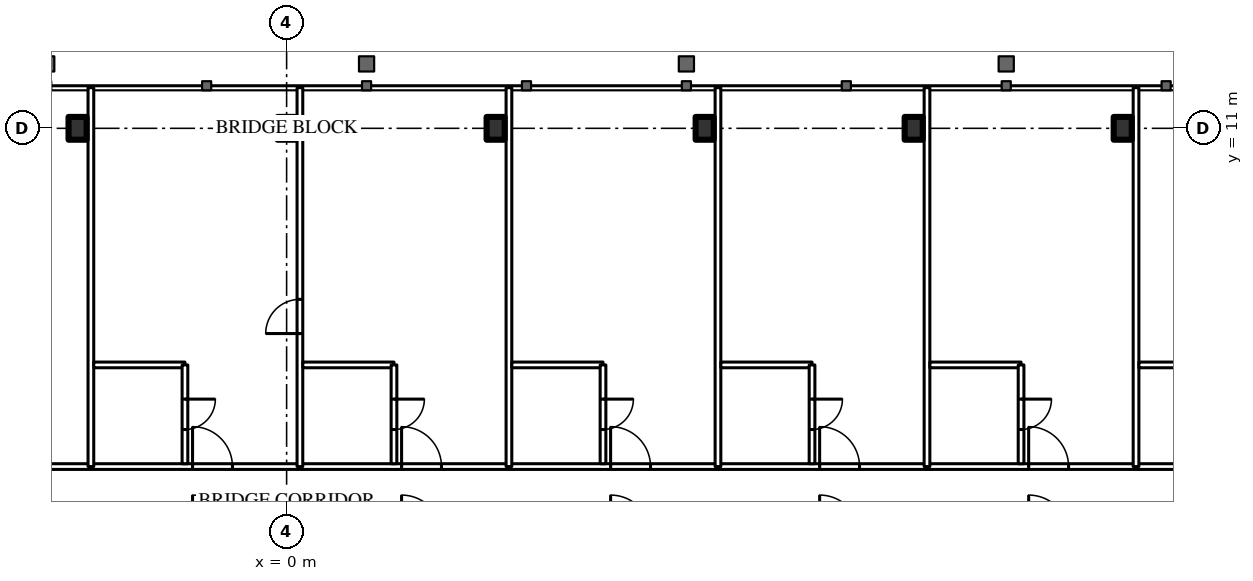
"""IFC4 building model, lengths in metres.
Left out: names, types, materials, properties, quantities, classifications, styles, units other than length and angle.
Written with IfcOpenShell. Run it as: python <this file> out.ifc"""

import sys

from ifc_helpers import new_model, si_unit, direction, frame, frame_2d, origin, origin_2d, place, context, subcontext, project, spatial, rectangle, i_section, extrude, element, fill, save


model = new_model("IFC4")
c1 = context("Model", 3, precision=1e-05, world=origin(), true_north=direction((0.0, 1.0)))
c2 = subcontext(c1, "Body", "Model", "MODEL_VIEW")
j1 = project(units=[si_unit("LENGTHUNIT", "METRE"), si_unit("PLANEANGLEUNIT", "RADIAN")], contexts=[c1])
p1 = place(None, origin())
s1 = spatial("IfcSite", under=j1, at=p1, CompositionType="ELEMENT")
p2 = place(p1, origin())
s2 = spatial("IfcBuilding", under=s1, at=p2, CompositionType="ELEMENT")
p3 = place(p2, frame((0.0, 0.0, 218.9)))
s3 = spatial("IfcBuildingStorey", under=s2, at=p3, CompositionType="ELEMENT", Elevation=218.9)
for number, where, z_axis, x_axis in (
    (1, (-5.5, 11.0, 0.0), (0.0, 0.0, 1.0), (1.0, 0.0, 0.0)),
    (2, (0.0, 11.0, 0.0), (0.0, 0.0, 1.0), (1.0, 0.0, 0.0)),
    (3, (5.5, 11.0, 0.0), (0.0, 0.0, 1.0), (1.0, 0.0, 0.0)),
    (4, (11.0, 11.0, 0.0), (0.0, 0.0, 1.0), (1.0, 0.0, 0.0)),
    (5, (16.5, 11.0, 0.0), (0.0, 0.0, 1.0), (1.0, 0.0, 0.0)),
    (6, (22.0, 11.0, 0.0), (0.0, 0.0, 1.0), (1.0, 0.0, 0.0)),
):
    element("IfcColumn", number, at=place(p3, frame(where, z_axis=z_axis, x_axis=x_axis)), inside=s3, PredefinedType="COLUMN", context=c2, shape_type="SweptSolid", body=[
        extrude(i_section(OverallWidth=0.476, OverallDepth=0.6, WebThickness=0.1, FlangeThickness=0.14, FilletRadius=0.02, at=origin_2d()), origin(), (0.0, 0.0, 1.0), 3.6),
    ])
p4 = place(p3, frame((-27.5, 2.1, 0.0), z_axis=(0.0, 0.0, 1.0), x_axis=(1.0, 0.0, 0.0)))
e7 = element("IfcWall", 7, at=p4, inside=s3, PredefinedType="PARTITIONING", context=c2, shape_type="SweptSolid", body=[
    extrude(rectangle(XDim=55.0, YDim=0.15, at=frame_2d((27.5, 0.0))), origin(), (0.0, 0.0, 1.0), 3.4),
])
p5 = place(p4, frame((2.025, 0.0, 0.0)))
e8 = element("IfcOpeningElement", 8, at=p5, cuts=e7, PredefinedType="OPENING", context=c2, shape_type="SweptSolid", body=[
    extrude(rectangle(XDim=1.05, YDim=2.4, at=frame_2d((0.525, 1.2))), frame((0.0, 0.085, 0.0), z_axis=(0.0, -1.0, 0.0), x_axis=(1.0, 0.0, 0.0)), (0.0, 0.0, 1.0), 0.17),
])
p6 = place(p4, frame((8.525, 0.0, 0.0)))
e9 = element("IfcOpeningElement", 9, at=p6, cuts=e7, PredefinedType="OPENING", context=c2, shape_type="SweptSolid", body=[
    extrude(rectangle(XDim=1.05, YDim=2.4, at=frame_2d((0.525, 1.2))), frame((0.0, 0.085, 0.0), z_axis=(0.0, -1.0, 0.0), x_axis=(1.0, 0.0, 0.0)), (0.0, 0.0, 1.0), 0.17),
])
p7 = place(p4, frame((14.025, 0.0, 0.0)))
e10 = element("IfcOpeningElement", 10, at=p7, cuts=e7, PredefinedType="OPENING", context=c2, shape_type="SweptSolid", body=[
    extrude(rectangle(XDim=1.05, YDim=2.4, at=frame_2d((0.525, 1.2))), frame((0.0, 0.085, 0.0), z_axis=(0.0, -1.0, 0.0), x_axis=(1.0, 0.0, 0.0)), (0.0, 0.0, 1.0), 0.17),
])
p8 = place(p4, frame((19.525, 0.0, 0.0)))
e11 = element("IfcOpeningElement", 11, at=p8, cuts=e7, PredefinedType="OPENING", context=c2, shape_type="SweptSolid", body=[
    extrude(rectangle(XDim=1.05, YDim=2.4, at=frame_2d((0.525, 1.2))), frame((0.0, 0.085, 0.0), z_axis=(0.0, -1.0, 0.0), x_axis=(1.0, 0.0, 0.0)), (0.0, 0.0, 1.0), 0.17),
])
p9 = place(p4, frame((25.025, 0.0, 0.0)))
e12 = element("IfcOpeningElement", 12, at=p9, cuts=e7, PredefinedType="OPENING", context=c2, shape_type="SweptSolid", body=[
    extrude(rectangle(XDim=1.05, YDim=2.4, at=frame_2d((0.525, 1.2))), frame((0.0, 0.085, 0.0), z_axis=(0.0, -1.0, 0.0), x_axis=(1.0, 0.0, 0.0)), (0.0, 0.0, 1.0), 0.17),
])
p10 = place(p4, frame((30.525, 0.0, 0.0)))
e13 = element("IfcOpeningElement", 13, at=p10, cuts=e7, PredefinedType="OPENING", context=c2, shape_type="SweptSolid", body=[
    extrude(rectangle(XDim=1.05, YDim=2.4, at=frame_2d((0.525, 1.2))), frame((0.0, 0.085, 0.0), z_axis=(0.0, -1.0, 0.0), x_axis=(1.0, 0.0, 0.0)), (0.0, 0.0, 1.0), 0.17),
])
p11 = place(p4, frame((36.025, 0.0, 0.0)))
e14 = element("IfcOpeningElement", 14, at=p11, cuts=e7, PredefinedType="OPENING", context=c2, shape_type="SweptSolid", body=[
    extrude(rectangle(XDim=1.05, YDim=2.4, at=frame_2d((0.525, 1.2))), frame((0.0, 0.085, 0.0), z_axis=(0.0, -1.0, 0.0), x_axis=(1.0, 0.0, 0.0)), (0.0, 0.0, 1.0), 0.17),
])
p12 = place(p4, frame((41.525, 0.0, 0.0)))
e15 = element("IfcOpeningElement", 15, at=p12, cuts=e7, PredefinedType="OPENING", context=c2, shape_type="SweptSolid", body=[
    extrude(rectangle(XDim=1.05, YDim=2.4, at=frame_2d((0.525, 1.2))), frame((0.0, 0.085, 0.0), z_axis=(0.0, -1.0, 0.0), x_axis=(1.0, 0.0, 0.0)), (0.0, 0.0, 1.0), 0.17),
])
p13 = place(p4, frame((47.025, 0.0, 0.0)))
e16 = element("IfcOpeningElement", 16, at=p13, cuts=e7, PredefinedType="OPENING", context=c2, shape_type="SweptSolid", body=[
    extrude(rectangle(XDim=1.05, YDim=2.4, at=frame_2d((0.525, 1.2))), frame((0.0, 0.085, 0.0), z_axis=(0.0, -1.0, 0.0), x_axis=(1.0, 0.0, 0.0)), (0.0, 0.0, 1.0), 0.17),
])
p14 = place(p4, frame((52.525, 0.0, 0.0)))
e17 = element("IfcOpeningElement", 17, at=p14, cuts=e7, PredefinedType="OPENING", context=c2, shape_type="SweptSolid", body=[
    extrude(rectangle(XDim=1.05, YDim=2.4, at=frame_2d((0.525, 1.2))), frame((0.0, 0.085, 0.0), z_axis=(0.0, -1.0, 0.0), x_axis=(1.0, 0.0, 0.0)), (0.0, 0.0, 1.0), 0.17),
])
p15 = place(p3, frame((-5.15, 2.1, 0.0), z_axis=(0.0, 0.0, 1.0), x_axis=(0.0, 1.0, 0.0)))
e18 = element("IfcWall", 18, at=p15, inside=s3, PredefinedType="PARTITIONING", context=c2, shape_type="SweptSolid", body=[
    extrude(rectangle(XDim=9.97, YDim=0.15, at=frame_2d((4.985, 0.0))), origin(), (0.0, 0.0, 1.0), 3.4),
])
p16 = place(p3, frame((0.35, 2.1, 0.0), z_axis=(0.0, 0.0, 1.0), x_axis=(0.0, 1.0, 0.0)))
e19 = element("IfcWall", 19, at=p16, inside=s3, PredefinedType="PARTITIONING", context=c2, shape_type="SweptSolid", body=[
    extrude(rectangle(XDim=9.97, YDim=0.15, at=frame_2d((4.985, 0.0))), origin(), (0.0, 0.0, 1.0), 3.4),
])
p17 = place(p16, frame((3.5, 0.0, 0.0)))
e20 = element("IfcOpeningElement", 20, at=p17, cuts=e19, PredefinedType="OPENING", context=c2, shape_type="SweptSolid", body=[
    extrude(rectangle(XDim=0.9, YDim=2.2, at=frame_2d((0.45, 1.1))), frame((0.0, 0.085, 0.0), z_axis=(0.0, -1.0, 0.0), x_axis=(1.0, 0.0, 0.0)), (0.0, 0.0, 1.0), 0.17),
])
for number, where, z_axis, x_axis in (
    (21, (5.85, 2.1, 0.0), (0.0, 0.0, 1.0), (0.0, 1.0, 0.0)),
    (22, (11.35, 2.1, 0.0), (0.0, 0.0, 1.0), (0.0, 1.0, 0.0)),
    (23, (16.85, 2.1, 0.0), (0.0, 0.0, 1.0), (0.0, 1.0, 0.0)),
    (24, (22.35, 2.1, 0.0), (0.0, 0.0, 1.0), (0.0, 1.0, 0.0)),
):
    element("IfcWall", number, at=place(p3, frame(where, z_axis=z_axis, x_axis=x_axis)), inside=s3, PredefinedType="PARTITIONING", context=c2, shape_type="SweptSolid", body=[
        extrude(rectangle(XDim=9.97, YDim=0.15, at=frame_2d((4.985, 0.0))), origin(), (0.0, 0.0, 1.0), 3.4),
    ])
p18 = place(p3, frame((-5.075, 4.775, 0.0), z_axis=(0.0, 0.0, 1.0), x_axis=(1.0, 0.0, 0.0)))
e25 = element("IfcWall", 25, at=p18, inside=s3, PredefinedType="PARTITIONING", context=c2, shape_type="SweptSolid", body=[
    extrude(rectangle(XDim=2.4, YDim=0.15, at=frame_2d((1.2, 0.0))), origin(), (0.0, 0.0, 1.0), 3.4),
])
p19 = place(p3, frame((-2.675, 2.175, 0.0), z_axis=(0.0, 0.0, 1.0), x_axis=(0.0, 1.0, 0.0)))
e26 = element("IfcWall", 26, at=p19, inside=s3, PredefinedType="PARTITIONING", context=c2, shape_type="SweptSolid", body=[
    extrude(rectangle(XDim=2.6, YDim=0.15, at=frame_2d((1.3, 0.0))), origin(), (0.0, 0.0, 1.0), 3.4),
])
p20 = place(p19, frame((0.9, 0.0, 0.0)))
e27 = element("IfcOpeningElement", 27, at=p20, cuts=e26, PredefinedType="OPENING", context=c2, shape_type="SweptSolid", body=[
    extrude(rectangle(XDim=0.8, YDim=2.2, at=frame_2d((0.4, 1.1))), frame((0.0, 0.085, 0.0), z_axis=(0.0, -1.0, 0.0), x_axis=(1.0, 0.0, 0.0)), (0.0, 0.0, 1.0), 0.17),
])
p21 = place(p3, frame((0.425, 4.775, 0.0), z_axis=(0.0, 0.0, 1.0), x_axis=(1.0, 0.0, 0.0)))
e28 = element("IfcWall", 28, at=p21, inside=s3, PredefinedType="PARTITIONING", context=c2, shape_type="SweptSolid", body=[
    extrude(rectangle(XDim=2.4, YDim=0.15, at=frame_2d((1.2, 0.0))), origin(), (0.0, 0.0, 1.0), 3.4),
])
p22 = place(p3, frame((2.825, 2.175, 0.0), z_axis=(0.0, 0.0, 1.0), x_axis=(0.0, 1.0, 0.0)))
e29 = element("IfcWall", 29, at=p22, inside=s3, PredefinedType="PARTITIONING", context=c2, shape_type="SweptSolid", body=[
    extrude(rectangle(XDim=2.6, YDim=0.15, at=frame_2d((1.3, 0.0))), origin(), (0.0, 0.0, 1.0), 3.4),
])
p23 = place(p22, frame((0.9, 0.0, 0.0)))
e30 = element("IfcOpeningElement", 30, at=p23, cuts=e29, PredefinedType="OPENING", context=c2, shape_type="SweptSolid", body=[
    extrude(rectangle(XDim=0.8, YDim=2.2, at=frame_2d((0.4, 1.1))), frame((0.0, 0.085, 0.0), z_axis=(0.0, -1.0, 0.0), x_axis=(1.0, 0.0, 0.0)), (0.0, 0.0, 1.0), 0.17),
])
p24 = place(p3, frame((5.925, 4.775, 0.0), z_axis=(0.0, 0.0, 1.0), x_axis=(1.0, 0.0, 0.0)))
e31 = element("IfcWall", 31, at=p24, inside=s3, PredefinedType="PARTITIONING", context=c2, shape_type="SweptSolid", body=[
    extrude(rectangle(XDim=2.4, YDim=0.15, at=frame_2d((1.2, 0.0))), origin(), (0.0, 0.0, 1.0), 3.4),
])
p25 = place(p3, frame((8.325, 2.175, 0.0), z_axis=(0.0, 0.0, 1.0), x_axis=(0.0, 1.0, 0.0)))
e32 = element("IfcWall", 32, at=p25, inside=s3, PredefinedType="PARTITIONING", context=c2, shape_type="SweptSolid", body=[
    extrude(rectangle(XDim=2.6, YDim=0.15, at=frame_2d((1.3, 0.0))), origin(), (0.0, 0.0, 1.0), 3.4),
])
p26 = place(p25, frame((0.9, 0.0, 0.0)))
e33 = element("IfcOpeningElement", 33, at=p26, cuts=e32, PredefinedType="OPENING", context=c2, shape_type="SweptSolid", body=[
    extrude(rectangle(XDim=0.8, YDim=2.2, at=frame_2d((0.4, 1.1))), frame((0.0, 0.085, 0.0), z_axis=(0.0, -1.0, 0.0), x_axis=(1.0, 0.0, 0.0)), (0.0, 0.0, 1.0), 0.17),
])
p27 = place(p3, frame((11.425, 4.775, 0.0), z_axis=(0.0, 0.0, 1.0), x_axis=(1.0, 0.0, 0.0)))
e34 = element("IfcWall", 34, at=p27, inside=s3, PredefinedType="PARTITIONING", context=c2, shape_type="SweptSolid", body=[
    extrude(rectangle(XDim=2.4, YDim=0.15, at=frame_2d((1.2, 0.0))), origin(), (0.0, 0.0, 1.0), 3.4),
])
p28 = place(p3, frame((13.825, 2.175, 0.0), z_axis=(0.0, 0.0, 1.0), x_axis=(0.0, 1.0, 0.0)))
e35 = element("IfcWall", 35, at=p28, inside=s3, PredefinedType="PARTITIONING", context=c2, shape_type="SweptSolid", body=[
    extrude(rectangle(XDim=2.6, YDim=0.15, at=frame_2d((1.3, 0.0))), origin(), (0.0, 0.0, 1.0), 3.4),
])
p29 = place(p28, frame((0.9, 0.0, 0.0)))
e36 = element("IfcOpeningElement", 36, at=p29, cuts=e35, PredefinedType="OPENING", context=c2, shape_type="SweptSolid", body=[
    extrude(rectangle(XDim=0.8, YDim=2.2, at=frame_2d((0.4, 1.1))), frame((0.0, 0.085, 0.0), z_axis=(0.0, -1.0, 0.0), x_axis=(1.0, 0.0, 0.0)), (0.0, 0.0, 1.0), 0.17),
])
p30 = place(p3, frame((16.925, 4.775, 0.0), z_axis=(0.0, 0.0, 1.0), x_axis=(1.0, 0.0, 0.0)))
e37 = element("IfcWall", 37, at=p30, inside=s3, PredefinedType="PARTITIONING", context=c2, shape_type="SweptSolid", body=[
    extrude(rectangle(XDim=2.4, YDim=0.15, at=frame_2d((1.2, 0.0))), origin(), (0.0, 0.0, 1.0), 3.4),
])
p31 = place(p3, frame((19.325, 2.175, 0.0), z_axis=(0.0, 0.0, 1.0), x_axis=(0.0, 1.0, 0.0)))
e38 = element("IfcWall", 38, at=p31, inside=s3, PredefinedType="PARTITIONING", context=c2, shape_type="SweptSolid", body=[
    extrude(rectangle(XDim=2.6, YDim=0.15, at=frame_2d((1.3, 0.0))), origin(), (0.0, 0.0, 1.0), 3.4),
])
p32 = place(p31, frame((0.9, 0.0, 0.0)))
e39 = element("IfcOpeningElement", 39, at=p32, cuts=e38, PredefinedType="OPENING", context=c2, shape_type="SweptSolid", body=[
    extrude(rectangle(XDim=0.8, YDim=2.2, at=frame_2d((0.4, 1.1))), frame((0.0, 0.085, 0.0), z_axis=(0.0, -1.0, 0.0), x_axis=(1.0, 0.0, 0.0)), (0.0, 0.0, 1.0), 0.17),
])
p33 = place(p3, frame((22.425, 4.775, 0.0), z_axis=(0.0, 0.0, 1.0), x_axis=(1.0, 0.0, 0.0)))
e40 = element("IfcWall", 40, at=p33, inside=s3, PredefinedType="PARTITIONING", context=c2, shape_type="SweptSolid", body=[
    extrude(rectangle(XDim=2.4, YDim=0.15, at=frame_2d((1.2, 0.0))), origin(), (0.0, 0.0, 1.0), 3.4),
])
p34 = place(p20, origin())
e41 = element("IfcDoor", 41, at=p34, inside=s3, OperationType="SINGLE_SWING_RIGHT", PredefinedType="DOOR", context=c2, shape_type="SweptSolid", body=[
    extrude(rectangle(XDim=0.8, YDim=2.2, at=frame_2d((0.4, 1.1))), frame((0.0, 0.025, 0.0), z_axis=(0.0, -1.0, 0.0), x_axis=(1.0, 0.0, 0.0)), (0.0, 0.0, 1.0), 0.05),
])
fill(e27, e41)
p35 = place(p9, origin())
e42 = element("IfcDoor", 42, at=p35, inside=s3, OperationType="SINGLE_SWING_LEFT", PredefinedType="DOOR", context=c2, shape_type="SweptSolid", body=[
    extrude(rectangle(XDim=1.05, YDim=2.4, at=frame_2d((0.525, 1.2))), frame((0.0, 0.025, 0.0), z_axis=(0.0, -1.0, 0.0), x_axis=(1.0, 0.0, 0.0)), (0.0, 0.0, 1.0), 0.05),
])
fill(e12, e42)
p36 = place(p23, origin())
e43 = element("IfcDoor", 43, at=p36, inside=s3, OperationType="SINGLE_SWING_RIGHT", PredefinedType="DOOR", context=c2, shape_type="SweptSolid", body=[
    extrude(rectangle(XDim=0.8, YDim=2.2, at=frame_2d((0.4, 1.1))), frame((0.0, 0.025, 0.0), z_axis=(0.0, -1.0, 0.0), x_axis=(1.0, 0.0, 0.0)), (0.0, 0.0, 1.0), 0.05),
])
fill(e30, e43)
p37 = place(p10, origin())
e44 = element("IfcDoor", 44, at=p37, inside=s3, OperationType="SINGLE_SWING_LEFT", PredefinedType="DOOR", context=c2, shape_type="SweptSolid", body=[
    extrude(rectangle(XDim=1.05, YDim=2.4, at=frame_2d((0.525, 1.2))), frame((0.0, 0.025, 0.0), z_axis=(0.0, -1.0, 0.0), x_axis=(1.0, 0.0, 0.0)), (0.0, 0.0, 1.0), 0.05),
])
fill(e13, e44)
p38 = place(p26, origin())
e45 = element("IfcDoor", 45, at=p38, inside=s3, OperationType="SINGLE_SWING_RIGHT", PredefinedType="DOOR", context=c2, shape_type="SweptSolid", body=[
    extrude(rectangle(XDim=0.8, YDim=2.2, at=frame_2d((0.4, 1.1))), frame((0.0, 0.025, 0.0), z_axis=(0.0, -1.0, 0.0), x_axis=(1.0, 0.0, 0.0)), (0.0, 0.0, 1.0), 0.05),
])
fill(e33, e45)
p39 = place(p11, origin())
e46 = element("IfcDoor", 46, at=p39, inside=s3, OperationType="SINGLE_SWING_LEFT", PredefinedType="DOOR", context=c2, shape_type="SweptSolid", body=[
    extrude(rectangle(XDim=1.05, YDim=2.4, at=frame_2d((0.525, 1.2))), frame((0.0, 0.025, 0.0), z_axis=(0.0, -1.0, 0.0), x_axis=(1.0, 0.0, 0.0)), (0.0, 0.0, 1.0), 0.05),
])
fill(e14, e46)
p40 = place(p29, origin())
e47 = element("IfcDoor", 47, at=p40, inside=s3, OperationType="SINGLE_SWING_RIGHT", PredefinedType="DOOR", context=c2, shape_type="SweptSolid", body=[
    extrude(rectangle(XDim=0.8, YDim=2.2, at=frame_2d((0.4, 1.1))), frame((0.0, 0.025, 0.0), z_axis=(0.0, -1.0, 0.0), x_axis=(1.0, 0.0, 0.0)), (0.0, 0.0, 1.0), 0.05),
])
fill(e36, e47)
p41 = place(p12, origin())
e48 = element("IfcDoor", 48, at=p41, inside=s3, OperationType="SINGLE_SWING_LEFT", PredefinedType="DOOR", context=c2, shape_type="SweptSolid", body=[
    extrude(rectangle(XDim=1.05, YDim=2.4, at=frame_2d((0.525, 1.2))), frame((0.0, 0.025, 0.0), z_axis=(0.0, -1.0, 0.0), x_axis=(1.0, 0.0, 0.0)), (0.0, 0.0, 1.0), 0.05),
])
fill(e15, e48)
p42 = place(p32, origin())
e49 = element("IfcDoor", 49, at=p42, inside=s3, OperationType="SINGLE_SWING_RIGHT", PredefinedType="DOOR", context=c2, shape_type="SweptSolid", body=[
    extrude(rectangle(XDim=0.8, YDim=2.2, at=frame_2d((0.4, 1.1))), frame((0.0, 0.025, 0.0), z_axis=(0.0, -1.0, 0.0), x_axis=(1.0, 0.0, 0.0)), (0.0, 0.0, 1.0), 0.05),
])
fill(e39, e49)
p43 = place(p13, origin())
e50 = element("IfcDoor", 50, at=p43, inside=s3, OperationType="SINGLE_SWING_LEFT", PredefinedType="DOOR", context=c2, shape_type="SweptSolid", body=[
    extrude(rectangle(XDim=1.05, YDim=2.4, at=frame_2d((0.525, 1.2))), frame((0.0, 0.025, 0.0), z_axis=(0.0, -1.0, 0.0), x_axis=(1.0, 0.0, 0.0)), (0.0, 0.0, 1.0), 0.05),
])
fill(e16, e50)
p44 = place(p17, origin())
e51 = element("IfcDoor", 51, at=p44, inside=s3, OperationType="SINGLE_SWING_LEFT", PredefinedType="DOOR", context=c2, shape_type="SweptSolid", body=[
    extrude(rectangle(XDim=0.9, YDim=2.2, at=frame_2d((0.45, 1.1))), frame((0.0, 0.025, 0.0), z_axis=(0.0, -1.0, 0.0), x_axis=(1.0, 0.0, 0.0)), (0.0, 0.0, 1.0), 0.05),
])
fill(e20, e51)
save(model, sys.argv[1])
